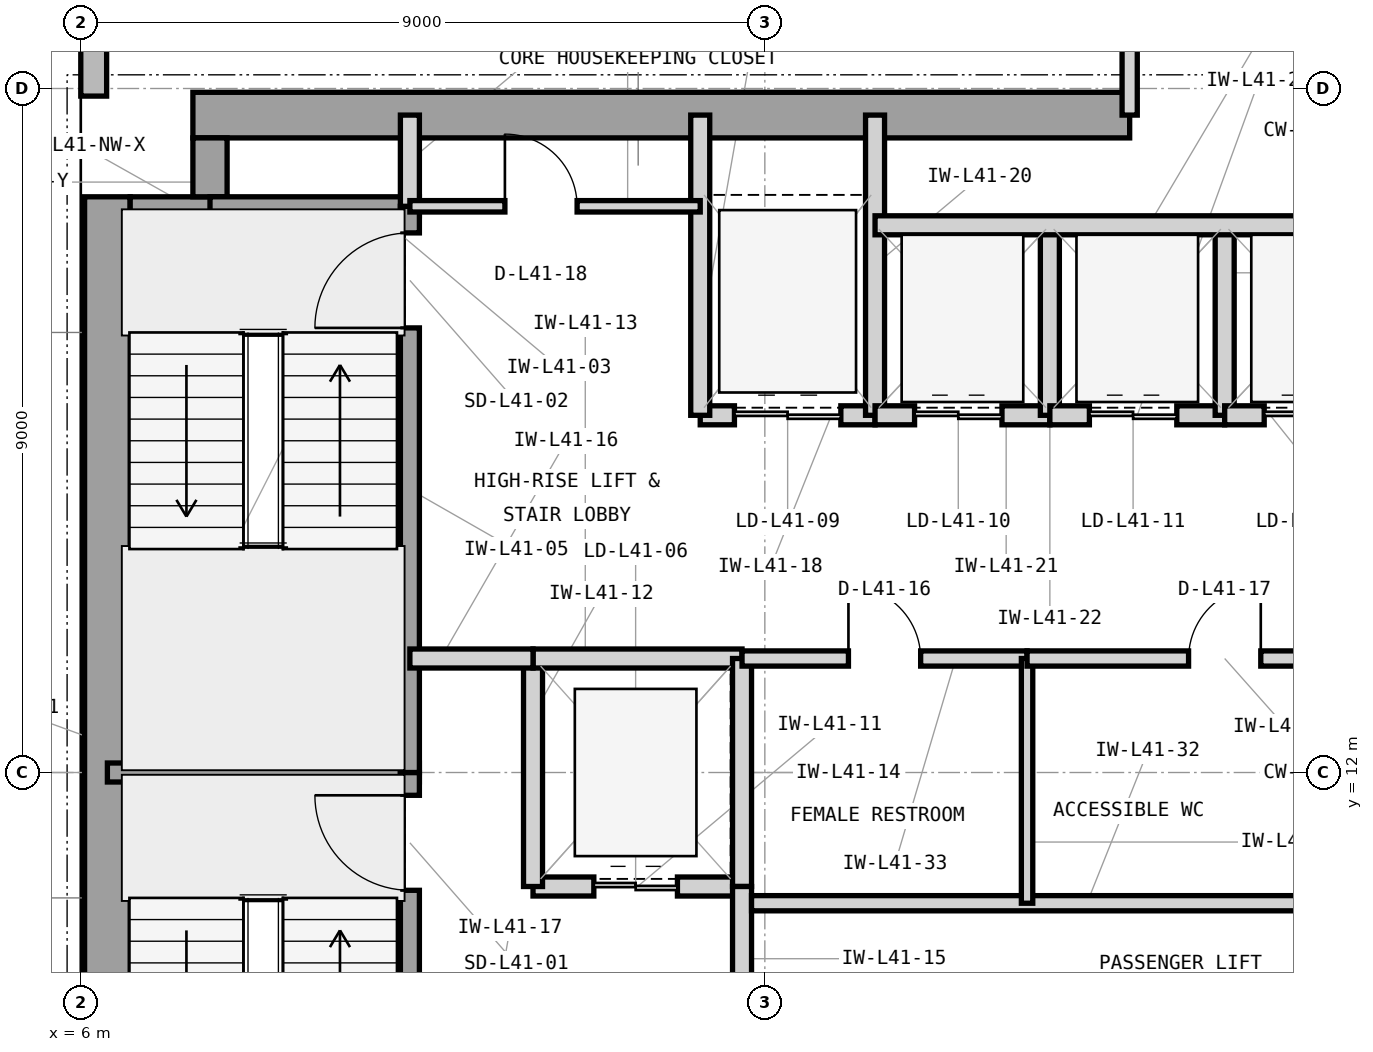
"""IFC4 building model, lengths in metres.
Left out: names, types, materials, properties, quantities, classifications, styles, units other than length and angle.
Written with IfcOpenShell. Run it as: python <this file> out.ifc"""

import sys

from ifc_helpers import new_model, si_unit, direction, frame, frame_2d, origin, place, context, subcontext, project, spatial, rectangle, extrude, element, fill, save


model = new_model("IFC4")
c1 = context("Model", 3, precision=1e-05, world=origin(), true_north=direction((0.0, 1.0)))
c2 = subcontext(c1, "Body", "Model", "MODEL_VIEW")
j1 = project(units=[si_unit("LENGTHUNIT", "METRE"), si_unit("PLANEANGLEUNIT", "RADIAN")], contexts=[c1])
p1 = place(None, origin())
s1 = spatial("IfcSite", under=j1, at=p1, CompositionType="ELEMENT")
p2 = place(p1, origin())
s2 = spatial("IfcBuilding", under=s1, at=p2, CompositionType="ELEMENT")
p3 = place(p2, frame((0.0, 0.0, 172.2)))
s3 = spatial("IfcBuildingStorey", under=s2, at=p3, CompositionType="ELEMENT", Elevation=172.2)
p4 = place(p3, frame((6.35, 4.425, 0.0), z_axis=(0.0, 0.0, 1.0), x_axis=(0.0, 1.0, 0.0)))
e1 = element("IfcWall", 1, at=p4, inside=s3, PredefinedType="SHEAR", context=c2, shape_type="SweptSolid", body=[
    extrude(rectangle(XDim=15.15, YDim=0.6, at=frame_2d((7.575, 0.0))), origin(), (0.0, 0.0, 1.0), 3.9),
])
p5 = place(p3, frame((7.475, 20.65, 0.0), z_axis=(0.0, 0.0, 1.0), x_axis=(1.0, 0.0, 0.0)))
e2 = element("IfcWall", 2, at=p5, inside=s3, PredefinedType="SHEAR", context=c2, shape_type="SweptSolid", body=[
    extrude(rectangle(XDim=12.325, YDim=0.6, at=frame_2d((6.163, 0.0))), origin(), (0.0, 0.0, 1.0), 3.9),
])
p6 = place(p3, frame((6.65, 19.35, 0.0), z_axis=(0.0, 0.0, 1.0), x_axis=(1.0, 0.0, 0.0)))
e3 = element("IfcWall", 3, at=p6, inside=s3, PredefinedType="SHEAR", context=c2, shape_type="SweptSolid", body=[
    extrude(rectangle(XDim=1.275, YDim=0.45, at=frame_2d((0.638, 0.0))), origin(), (0.0, 0.0, 1.0), 3.9),
])
p7 = place(p3, frame((7.7, 19.575, 0.0), z_axis=(0.0, 0.0, 1.0), x_axis=(0.0, 1.0, 0.0)))
e4 = element("IfcWall", 4, at=p7, inside=s3, PredefinedType="SHEAR", context=c2, shape_type="SweptSolid", body=[
    extrude(rectangle(XDim=0.775, YDim=0.45, at=frame_2d((0.388, 0.0))), origin(), (0.0, 0.0, 1.0), 3.9),
])
p8 = place(p3, frame((6.17, 43.4, 0.0), z_axis=(0.0, 0.0, 1.0), x_axis=(0.0, -1.0, 0.0)))
e5 = element("IfcWall", 5, at=p8, inside=s3, PredefinedType="STANDARD", context=c2, shape_type="SweptSolid", body=[
    extrude(rectangle(XDim=22.5, YDim=0.34, at=frame_2d((11.25, 0.0))), origin(), (0.0, 0.0, 1.0), 3.7),
])
p9 = place(p8, frame((10.1, 0.0, 0.9)))
e6 = element("IfcOpeningElement", 6, at=p9, cuts=e5, PredefinedType="OPENING", context=c2, shape_type="SweptSolid", body=[
    extrude(rectangle(XDim=2.3, YDim=2.2, at=frame_2d((1.15, 1.1))), frame((0.0, 0.18, 0.0), z_axis=(0.0, -1.0, 0.0), x_axis=(1.0, 0.0, 0.0)), (0.0, 0.0, 1.0), 0.36),
])
p10 = place(p8, frame((5.425, 0.0, 0.9)))
e7 = element("IfcOpeningElement", 7, at=p10, cuts=e5, PredefinedType="OPENING", context=c2, shape_type="SweptSolid", body=[
    extrude(rectangle(XDim=1.2, YDim=2.2, at=frame_2d((0.6, 1.1))), frame((0.0, 0.18, 0.0), z_axis=(0.0, -1.0, 0.0), x_axis=(1.0, 0.0, 0.0)), (0.0, 0.0, 1.0), 0.36),
])
p11 = place(p3, frame((6.35, 12.0, 0.0), z_axis=(0.0, 0.0, 1.0), x_axis=(1.0, 0.0, 0.0)))
e8 = element("IfcWall", 8, at=p11, inside=s3, PredefinedType="SHEAR", context=c2, shape_type="SweptSolid", body=[
    extrude(rectangle(XDim=4.105, YDim=0.25, at=frame_2d((2.052, 0.0))), origin(), (0.0, 0.0, 1.0), 3.9),
])
p12 = place(p3, frame((7.7, 19.45, 0.0), z_axis=(0.0, 0.0, 1.0), x_axis=(1.0, 0.0, 0.0)))
e9 = element("IfcWall", 9, at=p12, inside=s3, PredefinedType="SHEAR", context=c2, shape_type="SweptSolid", body=[
    extrude(rectangle(XDim=2.755, YDim=0.25, at=frame_2d((1.377, 0.0))), origin(), (0.0, 0.0, 1.0), 3.9),
])
p13 = place(p3, frame((10.33, 4.55, 0.0), z_axis=(0.0, 0.0, 1.0), x_axis=(0.0, 1.0, 0.0)))
e10 = element("IfcWall", 10, at=p13, inside=s3, PredefinedType="SHEAR", context=c2, shape_type="SweptSolid", body=[
    extrude(rectangle(XDim=7.45, YDim=0.25, at=frame_2d((3.725, 0.0))), origin(), (0.0, 0.0, 1.0), 3.9),
])
p14 = place(p13, frame((5.9, 0.0, 0.0)))
e11 = element("IfcOpeningElement", 11, at=p14, cuts=e10, PredefinedType="OPENING", context=c2, shape_type="SweptSolid", body=[
    extrude(rectangle(XDim=1.25, YDim=2.2, at=frame_2d((0.625, 1.1))), frame((0.0, 0.135, 0.0), z_axis=(0.0, -1.0, 0.0), x_axis=(1.0, 0.0, 0.0)), (0.0, 0.0, 1.0), 0.27),
])
p15 = place(p3, frame((10.33, 12.0, 0.0), z_axis=(0.0, 0.0, 1.0), x_axis=(0.0, 1.0, 0.0)))
e12 = element("IfcWall", 12, at=p15, inside=s3, PredefinedType="SHEAR", context=c2, shape_type="SweptSolid", body=[
    extrude(rectangle(XDim=7.45, YDim=0.25, at=frame_2d((3.725, 0.0))), origin(), (0.0, 0.0, 1.0), 3.9),
])
p16 = place(p15, frame((5.85, 0.0, 0.0)))
e13 = element("IfcOpeningElement", 13, at=p16, cuts=e12, PredefinedType="OPENING", context=c2, shape_type="SweptSolid", body=[
    extrude(rectangle(XDim=1.25, YDim=2.2, at=frame_2d((0.625, 1.1))), frame((0.0, 0.135, 0.0), z_axis=(0.0, -1.0, 0.0), x_axis=(1.0, 0.0, 0.0)), (0.0, 0.0, 1.0), 0.27),
])
p17 = place(p3, frame((10.33, 19.45, 0.0), z_axis=(0.0, 0.0, 1.0), x_axis=(0.0, 1.0, 0.0)))
e14 = element("IfcWall", 14, at=p17, inside=s3, PredefinedType="PARTITIONING", context=c2, shape_type="SweptSolid", body=[
    extrude(rectangle(XDim=1.2, YDim=0.25, at=frame_2d((0.6, 0.0))), origin(), (0.0, 0.0, 1.0), 3.073),
])
p18 = place(p3, frame((11.95, 10.5, 0.0), z_axis=(0.0, 0.0, 1.0), x_axis=(1.0, 0.0, 0.0)))
e15 = element("IfcWall", 15, at=p18, inside=s3, PredefinedType="PARTITIONING", context=c2, shape_type="SweptSolid", body=[
    extrude(rectangle(XDim=2.75, YDim=0.25, at=frame_2d((1.375, 0.0))), origin(), (0.0, 0.0, 1.0), 3.283),
])
p19 = place(p18, frame((0.8, 0.0, 0.0)))
e16 = element("IfcOpeningElement", 16, at=p19, cuts=e15, PredefinedType="OPENING", context=c2, shape_type="SweptSolid", body=[
    extrude(rectangle(XDim=1.1, YDim=2.25, at=frame_2d((0.55, 1.125))), frame((0.0, 0.135, 0.0), z_axis=(0.0, -1.0, 0.0), x_axis=(1.0, 0.0, 0.0)), (0.0, 0.0, 1.0), 0.27),
])
p20 = place(p3, frame((11.95, 10.5, 0.0), z_axis=(0.0, 0.0, 1.0), x_axis=(0.0, 1.0, 0.0)))
e17 = element("IfcWall", 17, at=p20, inside=s3, PredefinedType="PARTITIONING", context=c2, shape_type="SweptSolid", body=[
    extrude(rectangle(XDim=3.0, YDim=0.25, at=frame_2d((1.5, 0.0))), origin(), (0.0, 0.0, 1.0), 3.69),
])
p21 = place(p3, frame((11.95, 13.5, 0.0), z_axis=(0.0, 0.0, 1.0), x_axis=(1.0, 0.0, 0.0)))
e18 = element("IfcWall", 18, at=p21, inside=s3, PredefinedType="PARTITIONING", context=c2, shape_type="SweptSolid", body=[
    extrude(rectangle(XDim=2.75, YDim=0.25, at=frame_2d((1.375, 0.0))), origin(), (0.0, 0.0, 1.0), 3.283),
])
p22 = place(p3, frame((14.7, 10.5, 0.0), z_axis=(0.0, 0.0, 1.0), x_axis=(0.0, 1.0, 0.0)))
e19 = element("IfcWall", 19, at=p22, inside=s3, PredefinedType="PARTITIONING", context=c2, shape_type="SweptSolid", body=[
    extrude(rectangle(XDim=3.0, YDim=0.25, at=frame_2d((1.5, 0.0))), origin(), (0.0, 0.0, 1.0), 3.69),
])
p23 = place(p3, frame((14.7, 6.7, 0.0), z_axis=(0.0, 0.0, 1.0), x_axis=(0.0, 1.0, 0.0)))
e20 = element("IfcWall", 20, at=p23, inside=s3, PredefinedType="PARTITIONING", context=c2, shape_type="SweptSolid", body=[
    extrude(rectangle(XDim=3.8, YDim=0.25, at=frame_2d((1.9, 0.0))), origin(), (0.0, 0.0, 1.0), 3.69),
])
p24 = place(p23, frame((1.3, 0.0, 0.0)))
e21 = element("IfcOpeningElement", 21, at=p24, cuts=e20, PredefinedType="OPENING", context=c2, shape_type="SweptSolid", body=[
    extrude(rectangle(XDim=1.2, YDim=2.2, at=frame_2d((0.6, 1.1))), frame((0.0, 0.135, 0.0), z_axis=(0.0, -1.0, 0.0), x_axis=(1.0, 0.0, 0.0)), (0.0, 0.0, 1.0), 0.27),
])
p25 = place(p3, frame((10.33, 13.5, 0.0), z_axis=(0.0, 0.0, 1.0), x_axis=(1.0, 0.0, 0.0)))
e22 = element("IfcWall", 22, at=p25, inside=s3, PredefinedType="PARTITIONING", context=c2, shape_type="SweptSolid", body=[
    extrude(rectangle(XDim=1.62, YDim=0.25, at=frame_2d((0.81, 0.0))), origin(), (0.0, 0.0, 1.0), 3.283),
])
p26 = place(p3, frame((14.15, 16.7, 0.0), z_axis=(0.0, 0.0, 1.0), x_axis=(1.0, 0.0, 0.0)))
e23 = element("IfcWall", 23, at=p26, inside=s3, PredefinedType="PARTITIONING", context=c2, shape_type="SweptSolid", body=[
    extrude(rectangle(XDim=2.3, YDim=0.25, at=frame_2d((1.15, 0.0))), origin(), (0.0, 0.0, 1.0), 3.283),
])
p27 = place(p26, frame((0.45, 0.0, 0.0)))
e24 = element("IfcOpeningElement", 24, at=p27, cuts=e23, PredefinedType="OPENING", context=c2, shape_type="SweptSolid", body=[
    extrude(rectangle(XDim=1.4, YDim=2.35, at=frame_2d((0.7, 1.175))), frame((0.0, 0.135, 0.0), z_axis=(0.0, -1.0, 0.0), x_axis=(1.0, 0.0, 0.0)), (0.0, 0.0, 1.0), 0.27),
])
for number, where, z_axis, x_axis in (
    (25, (14.15, 16.7, 0.0), (0.0, 0.0, 1.0), (0.0, 1.0, 0.0)),
    (26, (16.45, 16.7, 0.0), (0.0, 0.0, 1.0), (0.0, 1.0, 0.0)),
):
    element("IfcWall", number, at=place(p3, frame(where, z_axis=z_axis, x_axis=x_axis)), inside=s3, PredefinedType="PARTITIONING", context=c2, shape_type="SweptSolid", body=[
        extrude(rectangle(XDim=3.95, YDim=0.25, at=frame_2d((1.975, 0.0))), origin(), (0.0, 0.0, 1.0), 3.69),
    ])
p28 = place(p3, frame((16.45, 16.7, 0.0), z_axis=(0.0, 0.0, 1.0), x_axis=(1.0, 0.0, 0.0)))
e27 = element("IfcWall", 27, at=p28, inside=s3, PredefinedType="PARTITIONING", context=c2, shape_type="SweptSolid", body=[
    extrude(rectangle(XDim=2.3, YDim=0.25, at=frame_2d((1.15, 0.0))), origin(), (0.0, 0.0, 1.0), 3.283),
])
p29 = place(p28, frame((0.52, 0.0, 0.0)))
e28 = element("IfcOpeningElement", 28, at=p29, cuts=e27, PredefinedType="OPENING", context=c2, shape_type="SweptSolid", body=[
    extrude(rectangle(XDim=1.15, YDim=2.25, at=frame_2d((0.575, 1.125))), frame((0.0, 0.135, 0.0), z_axis=(0.0, -1.0, 0.0), x_axis=(1.0, 0.0, 0.0)), (0.0, 0.0, 1.0), 0.27),
])
p30 = place(p3, frame((18.75, 16.7, 0.0), z_axis=(0.0, 0.0, 1.0), x_axis=(0.0, 1.0, 0.0)))
e29 = element("IfcWall", 29, at=p30, inside=s3, PredefinedType="PARTITIONING", context=c2, shape_type="SweptSolid", body=[
    extrude(rectangle(XDim=2.5, YDim=0.25, at=frame_2d((1.25, 0.0))), origin(), (0.0, 0.0, 1.0), 3.69),
])
p31 = place(p3, frame((18.75, 16.7, 0.0), z_axis=(0.0, 0.0, 1.0), x_axis=(1.0, 0.0, 0.0)))
e30 = element("IfcWall", 30, at=p31, inside=s3, PredefinedType="PARTITIONING", context=c2, shape_type="SweptSolid", body=[
    extrude(rectangle(XDim=2.3, YDim=0.25, at=frame_2d((1.15, 0.0))), origin(), (0.0, 0.0, 1.0), 3.283),
])
p32 = place(p31, frame((0.52, 0.0, 0.0)))
e31 = element("IfcOpeningElement", 31, at=p32, cuts=e30, PredefinedType="OPENING", context=c2, shape_type="SweptSolid", body=[
    extrude(rectangle(XDim=1.15, YDim=2.25, at=frame_2d((0.575, 1.125))), frame((0.0, 0.135, 0.0), z_axis=(0.0, -1.0, 0.0), x_axis=(1.0, 0.0, 0.0)), (0.0, 0.0, 1.0), 0.27),
])
p33 = place(p3, frame((21.05, 16.7, 0.0), z_axis=(0.0, 0.0, 1.0), x_axis=(0.0, 1.0, 0.0)))
e32 = element("IfcWall", 32, at=p33, inside=s3, PredefinedType="PARTITIONING", context=c2, shape_type="SweptSolid", body=[
    extrude(rectangle(XDim=2.5, YDim=0.25, at=frame_2d((1.25, 0.0))), origin(), (0.0, 0.0, 1.0), 3.69),
])
p34 = place(p3, frame((21.05, 16.7, 0.0), z_axis=(0.0, 0.0, 1.0), x_axis=(1.0, 0.0, 0.0)))
e33 = element("IfcWall", 33, at=p34, inside=s3, PredefinedType="PARTITIONING", context=c2, shape_type="SweptSolid", body=[
    extrude(rectangle(XDim=2.4, YDim=0.25, at=frame_2d((1.2, 0.0))), origin(), (0.0, 0.0, 1.0), 3.283),
])
p35 = place(p34, frame((0.52, 0.0, 0.0)))
e34 = element("IfcOpeningElement", 34, at=p35, cuts=e33, PredefinedType="OPENING", context=c2, shape_type="SweptSolid", body=[
    extrude(rectangle(XDim=1.15, YDim=2.25, at=frame_2d((0.575, 1.125))), frame((0.0, 0.135, 0.0), z_axis=(0.0, -1.0, 0.0), x_axis=(1.0, 0.0, 0.0)), (0.0, 0.0, 1.0), 0.27),
])
p36 = place(p3, frame((16.45, 19.2, 0.0), z_axis=(0.0, 0.0, 1.0), x_axis=(1.0, 0.0, 0.0)))
e35 = element("IfcWall", 35, at=p36, inside=s3, PredefinedType="PARTITIONING", context=c2, shape_type="SweptSolid", body=[
    extrude(rectangle(XDim=7.2, YDim=0.25, at=frame_2d((3.6, 0.0))), origin(), (0.0, 0.0, 1.0), 3.69),
])
p37 = place(p3, frame((14.825, 10.28, 0.0), z_axis=(0.0, 0.0, 1.0), x_axis=(1.0, 0.0, 0.0)))
e36 = element("IfcWall", 36, at=p37, inside=s3, PredefinedType="PARTITIONING", context=c2, shape_type="SweptSolid", body=[
    extrude(rectangle(XDim=8.825, YDim=0.2, at=frame_2d((4.413, 0.0))), origin(), (0.0, 0.0, 1.0), 3.69),
])
p38 = place(p3, frame((14.7, 13.5, 0.0), z_axis=(0.0, 0.0, 1.0), x_axis=(1.0, 0.0, 0.0)))
e37 = element("IfcWall", 37, at=p38, inside=s3, PredefinedType="PARTITIONING", context=c2, shape_type="SweptSolid", body=[
    extrude(rectangle(XDim=3.75, YDim=0.2, at=frame_2d((1.875, 0.0))), origin(), (0.0, 0.0, 1.0), 3.283),
])
p39 = place(p38, frame((1.4, 0.0, 0.0)))
e38 = element("IfcOpeningElement", 38, at=p39, cuts=e37, PredefinedType="OPENING", context=c2, shape_type="SweptSolid", body=[
    extrude(rectangle(XDim=0.95, YDim=2.1, at=frame_2d((0.475, 1.05))), frame((0.0, 0.11, 0.0), z_axis=(0.0, -1.0, 0.0), x_axis=(1.0, 0.0, 0.0)), (0.0, 0.0, 1.0), 0.22),
])
p40 = place(p3, frame((18.45, 10.28, 0.0), z_axis=(0.0, 0.0, 1.0), x_axis=(0.0, 1.0, 0.0)))
e39 = element("IfcWall", 39, at=p40, inside=s3, PredefinedType="PARTITIONING", context=c2, shape_type="SweptSolid", body=[
    extrude(rectangle(XDim=3.22, YDim=0.15, at=frame_2d((1.61, 0.0))), origin(), (0.0, 0.0, 1.0), 3.69),
])
p41 = place(p3, frame((18.45, 13.5, 0.0), z_axis=(0.0, 0.0, 1.0), x_axis=(1.0, 0.0, 0.0)))
e40 = element("IfcWall", 40, at=p41, inside=s3, PredefinedType="PARTITIONING", context=c2, shape_type="SweptSolid", body=[
    extrude(rectangle(XDim=5.2, YDim=0.2, at=frame_2d((2.6, 0.0))), origin(), (0.0, 0.0, 1.0), 3.283),
])
p42 = place(p41, frame((2.125, 0.0, 0.0)))
e41 = element("IfcOpeningElement", 41, at=p42, cuts=e40, PredefinedType="OPENING", context=c2, shape_type="SweptSolid", body=[
    extrude(rectangle(XDim=0.95, YDim=2.1, at=frame_2d((0.475, 1.05))), frame((0.0, 0.11, 0.0), z_axis=(0.0, -1.0, 0.0), x_axis=(1.0, 0.0, 0.0)), (0.0, 0.0, 1.0), 0.22),
])
p43 = place(p3, frame((10.33, 19.45, 0.0), z_axis=(0.0, 0.0, 1.0), x_axis=(1.0, 0.0, 0.0)))
e42 = element("IfcWall", 42, at=p43, inside=s3, PredefinedType="PARTITIONING", context=c2, shape_type="SweptSolid", body=[
    extrude(rectangle(XDim=3.82, YDim=0.15, at=frame_2d((1.91, 0.0))), origin(), (0.0, 0.0, 1.0), 3.69),
])
p44 = place(p43, frame((1.25, 0.0, 0.0)))
e43 = element("IfcOpeningElement", 43, at=p44, cuts=e42, PredefinedType="OPENING", context=c2, shape_type="SweptSolid", body=[
    extrude(rectangle(XDim=0.95, YDim=2.1, at=frame_2d((0.475, 1.05))), frame((0.0, 0.085, 0.0), z_axis=(0.0, -1.0, 0.0), x_axis=(1.0, 0.0, 0.0)), (0.0, 0.0, 1.0), 0.17),
])
p45 = place(p3, frame((19.8, 20.65, 0.0), z_axis=(0.0, 0.0, 1.0), x_axis=(0.0, 1.0, 0.0)))
e44 = element("IfcWall", 44, at=p45, inside=s3, PredefinedType="PARTITIONING", context=c2, shape_type="SweptSolid", body=[
    extrude(rectangle(XDim=6.15, YDim=0.2, at=frame_2d((3.075, 0.0))), origin(), (0.0, 0.0, 1.0), 3.69),
])
p46 = place(p14, origin())
e45 = element("IfcDoor", 45, at=p46, inside=s3, OperationType="SINGLE_SWING_RIGHT", PredefinedType="DOOR", context=c2, shape_type="SweptSolid", body=[
    extrude(rectangle(XDim=1.25, YDim=2.2, at=frame_2d((0.625, 1.1))), frame((0.0, 0.025, 0.0), z_axis=(0.0, -1.0, 0.0), x_axis=(1.0, 0.0, 0.0)), (0.0, 0.0, 1.0), 0.05),
])
fill(e11, e45)
p47 = place(p16, origin())
e46 = element("IfcDoor", 46, at=p47, inside=s3, OperationType="SINGLE_SWING_LEFT", PredefinedType="DOOR", context=c2, shape_type="SweptSolid", body=[
    extrude(rectangle(XDim=1.25, YDim=2.2, at=frame_2d((0.625, 1.1))), frame((0.0, 0.025, 0.0), z_axis=(0.0, -1.0, 0.0), x_axis=(1.0, 0.0, 0.0)), (0.0, 0.0, 1.0), 0.05),
])
fill(e13, e46)
p48 = place(p19, origin())
e47 = element("IfcDoor", 47, at=p48, inside=s3, OperationType="DOUBLE_DOOR_SLIDING", PredefinedType="DOOR", context=c2, shape_type="SweptSolid", body=[
    extrude(rectangle(XDim=1.1, YDim=2.25, at=frame_2d((0.55, 1.125))), frame((0.0, 0.025, 0.0), z_axis=(0.0, -1.0, 0.0), x_axis=(1.0, 0.0, 0.0)), (0.0, 0.0, 1.0), 0.05),
])
fill(e16, e47)
p49 = place(p27, origin())
e48 = element("IfcDoor", 48, at=p49, inside=s3, OperationType="DOUBLE_DOOR_SLIDING", PredefinedType="DOOR", context=c2, shape_type="SweptSolid", body=[
    extrude(rectangle(XDim=1.4, YDim=2.35, at=frame_2d((0.7, 1.175))), frame((0.0, 0.025, 0.0), z_axis=(0.0, -1.0, 0.0), x_axis=(1.0, 0.0, 0.0)), (0.0, 0.0, 1.0), 0.05),
])
fill(e24, e48)
p50 = place(p29, origin())
e49 = element("IfcDoor", 49, at=p50, inside=s3, OperationType="DOUBLE_DOOR_SLIDING", PredefinedType="DOOR", context=c2, shape_type="SweptSolid", body=[
    extrude(rectangle(XDim=1.15, YDim=2.25, at=frame_2d((0.575, 1.125))), frame((0.0, 0.025, 0.0), z_axis=(0.0, -1.0, 0.0), x_axis=(1.0, 0.0, 0.0)), (0.0, 0.0, 1.0), 0.05),
])
fill(e28, e49)
p51 = place(p32, origin())
e50 = element("IfcDoor", 50, at=p51, inside=s3, OperationType="DOUBLE_DOOR_SLIDING", PredefinedType="DOOR", context=c2, shape_type="SweptSolid", body=[
    extrude(rectangle(XDim=1.15, YDim=2.25, at=frame_2d((0.575, 1.125))), frame((0.0, 0.025, 0.0), z_axis=(0.0, -1.0, 0.0), x_axis=(1.0, 0.0, 0.0)), (0.0, 0.0, 1.0), 0.05),
])
fill(e31, e50)
p52 = place(p35, origin())
e51 = element("IfcDoor", 51, at=p52, inside=s3, OperationType="DOUBLE_DOOR_SLIDING", PredefinedType="DOOR", context=c2, shape_type="SweptSolid", body=[
    extrude(rectangle(XDim=1.15, YDim=2.25, at=frame_2d((0.575, 1.125))), frame((0.0, 0.025, 0.0), z_axis=(0.0, -1.0, 0.0), x_axis=(1.0, 0.0, 0.0)), (0.0, 0.0, 1.0), 0.05),
])
fill(e34, e51)
p53 = place(p39, origin())
e52 = element("IfcDoor", 52, at=p53, inside=s3, OperationType="SINGLE_SWING_LEFT", PredefinedType="DOOR", context=c2, shape_type="SweptSolid", body=[
    extrude(rectangle(XDim=0.95, YDim=2.1, at=frame_2d((0.475, 1.05))), frame((0.0, 0.025, 0.0), z_axis=(0.0, -1.0, 0.0), x_axis=(1.0, 0.0, 0.0)), (0.0, 0.0, 1.0), 0.05),
])
fill(e38, e52)
p54 = place(p42, origin())
e53 = element("IfcDoor", 53, at=p54, inside=s3, OperationType="SINGLE_SWING_RIGHT", PredefinedType="DOOR", context=c2, shape_type="SweptSolid", body=[
    extrude(rectangle(XDim=0.95, YDim=2.1, at=frame_2d((0.475, 1.05))), frame((0.0, 0.025, 0.0), z_axis=(0.0, -1.0, 0.0), x_axis=(1.0, 0.0, 0.0)), (0.0, 0.0, 1.0), 0.05),
])
fill(e41, e53)
p55 = place(p44, origin())
e54 = element("IfcDoor", 54, at=p55, inside=s3, OperationType="SINGLE_SWING_LEFT", PredefinedType="DOOR", context=c2, shape_type="SweptSolid", body=[
    extrude(rectangle(XDim=0.95, YDim=2.1, at=frame_2d((0.475, 1.05))), frame((0.0, 0.025, 0.0), z_axis=(0.0, -1.0, 0.0), x_axis=(1.0, 0.0, 0.0)), (0.0, 0.0, 1.0), 0.05),
])
fill(e43, e54)
save(model, sys.argv[1])
